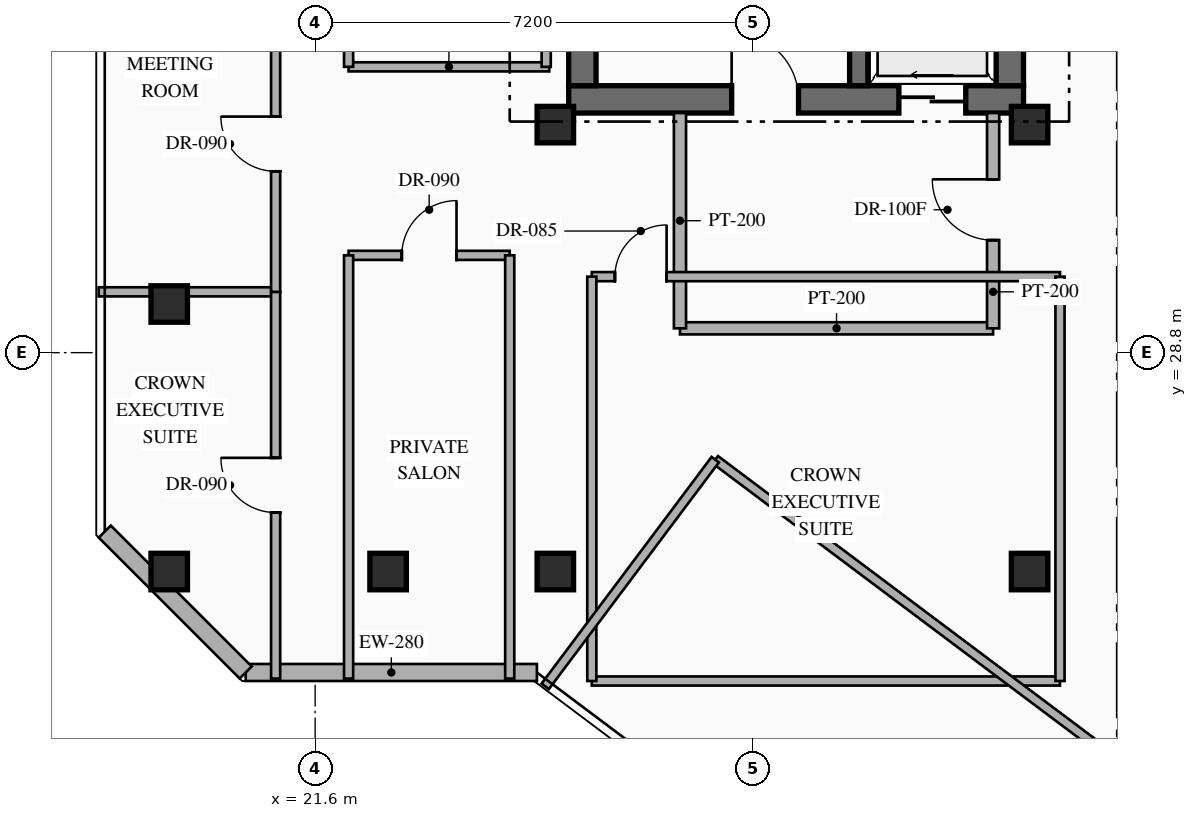
"""IFC4 building model, lengths in metres.
Left out: names, types, materials, properties, quantities, classifications, styles, units other than length and angle.
Written with IfcOpenShell. Run it as: python <this file> out.ifc"""

import sys

from ifc_helpers import new_model, si_unit, direction, frame, frame_2d, origin, origin_2d, place, context, subcontext, project, spatial, rectangle, hollow_rectangle, extrude, element, fill, save


model = new_model("IFC4")
c1 = context("Model", 3, precision=1e-05, world=origin(), true_north=direction((0.0, 1.0)))
c2 = subcontext(c1, "Body", "Model", "MODEL_VIEW")
j1 = project(units=[si_unit("LENGTHUNIT", "METRE"), si_unit("PLANEANGLEUNIT", "RADIAN")], contexts=[c1])
p1 = place(None, origin())
s1 = spatial("IfcSite", under=j1, at=p1, CompositionType="ELEMENT")
p2 = place(p1, origin())
s2 = spatial("IfcBuilding", under=s1, at=p2, CompositionType="ELEMENT")
p3 = place(p2, frame((0.0, 0.0, 269.95)))
s3 = spatial("IfcBuildingStorey", under=s2, at=p3, CompositionType="ELEMENT", Elevation=269.95)
p4 = place(p3, frame((25.77, 32.965, 0.0), z_axis=(0.0, 0.0, 1.0), x_axis=(1.0, 0.0, 0.0)))
e1 = element("IfcWall", 1, at=p4, inside=s3, PredefinedType="SHEAR", context=c2, shape_type="SweptSolid", body=[
    extrude(rectangle(XDim=7.48, YDim=0.45, at=frame_2d((3.74, 0.0))), origin(), (0.0, 0.0, 1.0), 4.0),
])
p5 = place(p4, frame((2.68, 0.0, 0.0)))
e2 = element("IfcOpeningElement", 2, at=p5, cuts=e1, PredefinedType="OPENING", context=c2, shape_type="SweptSolid", body=[
    extrude(rectangle(XDim=1.1, YDim=2.2, at=frame_2d((0.55, 1.1))), frame((0.0, 0.235, 0.0), z_axis=(0.0, -1.0, 0.0), x_axis=(1.0, 0.0, 0.0)), (0.0, 0.0, 1.0), 0.47),
])
p6 = place(p4, frame((5.43, 0.0, 0.0)))
e3 = element("IfcOpeningElement", 3, at=p6, cuts=e1, PredefinedType="OPENING", context=c2, shape_type="SweptSolid", body=[
    extrude(rectangle(XDim=1.1, YDim=2.15, at=frame_2d((0.55, 1.075))), frame((0.0, 0.235, 0.0), z_axis=(0.0, -1.0, 0.0), x_axis=(1.0, 0.0, 0.0)), (0.0, 0.0, 1.0), 0.47),
])
p7 = place(p3, frame((25.995, 33.19, 0.0), z_axis=(0.0, 0.0, 1.0), x_axis=(0.0, 1.0, 0.0)))
e4 = element("IfcWall", 4, at=p7, inside=s3, PredefinedType="SHEAR", context=c2, shape_type="SweptSolid", body=[
    extrude(rectangle(XDim=9.48, YDim=0.45, at=frame_2d((4.74, 0.0))), origin(), (0.0, 0.0, 1.0), 4.0),
])
p8 = place(p3, frame((33.025, 33.19, 0.0), z_axis=(0.0, 0.0, 1.0), x_axis=(0.0, 1.0, 0.0)))
e5 = element("IfcWall", 5, at=p8, inside=s3, PredefinedType="SHEAR", context=c2, shape_type="SweptSolid", body=[
    extrude(rectangle(XDim=9.48, YDim=0.45, at=frame_2d((4.74, 0.0))), origin(), (0.0, 0.0, 1.0), 4.0),
])
p9 = place(p8, frame((4.16, 0.0, 0.0)))
e6 = element("IfcOpeningElement", 6, at=p9, cuts=e5, PredefinedType="OPENING", context=c2, shape_type="SweptSolid", body=[
    extrude(rectangle(XDim=0.85, YDim=2.08, at=frame_2d((0.425, 1.04))), frame((0.0, 0.235, 0.0), z_axis=(0.0, -1.0, 0.0), x_axis=(1.0, 0.0, 0.0)), (0.0, 0.0, 1.0), 0.47),
])
p10 = place(p8, frame((7.36, 0.0, 0.0)))
e7 = element("IfcOpeningElement", 7, at=p10, cuts=e5, PredefinedType="OPENING", context=c2, shape_type="SweptSolid", body=[
    extrude(rectangle(XDim=0.85, YDim=2.08, at=frame_2d((0.425, 1.04))), frame((0.0, 0.235, 0.0), z_axis=(0.0, -1.0, 0.0), x_axis=(1.0, 0.0, 0.0)), (0.0, 0.0, 1.0), 0.47),
])
p11 = place(p3, frame((30.54, 33.19, 0.0), z_axis=(0.0, 0.0, 1.0), x_axis=(0.0, 1.0, 0.0)))
e8 = element("IfcWall", 8, at=p11, inside=s3, PredefinedType="SHEAR", context=c2, shape_type="SweptSolid", body=[
    extrude(rectangle(XDim=9.48, YDim=0.3, at=frame_2d((4.74, 0.0))), origin(), (0.0, 0.0, 1.0), 4.0),
])
for number, where, z_axis, x_axis in (
    (9, (25.55, 32.55, 0.0), (0.0, 0.0, 1.0), (1.0, 0.0, 0.0)),
    (10, (33.35, 32.55, 0.0), (0.0, 0.0, 1.0), (1.0, 0.0, 0.0)),
    (11, (25.55, 25.2, 0.0), (0.0, 0.0, 1.0), (1.0, 0.0, 0.0)),
    (12, (33.35, 25.2, 0.0), (0.0, 0.0, 1.0), (1.0, 0.0, 0.0)),
):
    element("IfcColumn", number, at=place(p3, frame(where, z_axis=z_axis, x_axis=x_axis)), inside=s3, PredefinedType="COLUMN", context=c2, shape_type="SweptSolid", body=[
        extrude(hollow_rectangle(XDim=0.6, YDim=0.6, WallThickness=0.025, at=origin_2d()), origin(), (0.0, 0.0, 1.0), 4.0),
    ])
for number, where, z_axis, x_axis in (
    (13, (19.2, 25.2, 0.0), (0.0, 0.0, 1.0), (1.0, 0.0, 0.0)),
    (14, (19.2, 29.6, 0.0), (0.0, 0.0, 1.0), (1.0, 0.0, 0.0)),
):
    element("IfcColumn", number, at=place(p3, frame(where, z_axis=z_axis, x_axis=x_axis)), inside=s3, PredefinedType="COLUMN", context=c2, shape_type="SweptSolid", body=[
        extrude(hollow_rectangle(XDim=0.6, YDim=0.6, WallThickness=0.025, at=origin_2d()), origin(), (0.0, 0.0, 1.0), 3.718),
    ])
p12 = place(p3, frame((22.8, 25.2, 0.0), z_axis=(0.0, 0.0, 1.0), x_axis=(1.0, 0.0, 0.0)))
e15 = element("IfcColumn", 15, at=p12, inside=s3, PredefinedType="COLUMN", context=c2, shape_type="SweptSolid", body=[
    extrude(hollow_rectangle(XDim=0.6, YDim=0.6, WallThickness=0.025, at=origin_2d()), origin(), (0.0, 0.0, 1.0), 4.0),
])
p13 = place(p3, frame((25.247, 23.54, 0.0), z_axis=(0.0, 0.0, 1.0), x_axis=(-1.0, 0.0, 0.0)))
e16 = element("IfcWall", 16, at=p13, inside=s3, PredefinedType="STANDARD", context=c2, shape_type="SweptSolid", body=[
    extrude(rectangle(XDim=4.789, YDim=0.28, at=frame_2d((2.395, 0.0))), origin(), (0.0, 0.0, 1.0), 3.74),
])
p14 = place(p3, frame((20.458, 23.54, 0.0), z_axis=(0.0, 0.0, 1.0), x_axis=(-0.707144017911, 0.707069542501, 0.0)))
e17 = element("IfcWall", 17, at=p14, inside=s3, PredefinedType="STANDARD", context=c2, shape_type="SweptSolid", body=[
    extrude(rectangle(XDim=3.278, YDim=0.28, at=frame_2d((1.639, 0.0))), origin(), (0.0, 0.0, 1.0), 3.74),
])
p15 = place(p3, frame((27.6, 29.2, 0.0), z_axis=(0.0, 0.0, 1.0), x_axis=(1.0, 0.0, 0.0)))
e18 = element("IfcWall", 18, at=p15, inside=s3, PredefinedType="STANDARD", context=c2, shape_type="SweptSolid", body=[
    extrude(rectangle(XDim=5.15, YDim=0.2, at=frame_2d((2.575, 0.0))), origin(), (0.0, 0.0, 1.0), 3.74),
])
p16 = place(p3, frame((27.6, 29.2, 0.0), z_axis=(0.0, 0.0, 1.0), x_axis=(0.0, 1.0, 0.0)))
e19 = element("IfcWall", 19, at=p16, inside=s3, PredefinedType="STANDARD", context=c2, shape_type="SweptSolid", body=[
    extrude(rectangle(XDim=3.54, YDim=0.2, at=frame_2d((1.77, 0.0))), origin(), (0.0, 0.0, 1.0), 3.74),
])
p17 = place(p3, frame((32.75, 29.2, 0.0), z_axis=(0.0, 0.0, 1.0), x_axis=(0.0, 1.0, 0.0)))
e20 = element("IfcWall", 20, at=p17, inside=s3, PredefinedType="STANDARD", context=c2, shape_type="SweptSolid", body=[
    extrude(rectangle(XDim=3.54, YDim=0.2, at=frame_2d((1.77, 0.0))), origin(), (0.0, 0.0, 1.0), 3.74),
])
p18 = place(p17, frame((1.45, 0.0, 0.0)))
e21 = element("IfcOpeningElement", 21, at=p18, cuts=e20, PredefinedType="OPENING", context=c2, shape_type="SweptSolid", body=[
    extrude(rectangle(XDim=1.0, YDim=2.2, at=frame_2d((0.5, 1.1))), frame((0.0, 0.11, 0.0), z_axis=(0.0, -1.0, 0.0), x_axis=(1.0, 0.0, 0.0)), (0.0, 0.0, 1.0), 0.22),
])
p19 = place(p3, frame((22.15, 33.5, 0.0), z_axis=(0.0, 0.0, 1.0), x_axis=(1.0, 0.0, 0.0)))
e22 = element("IfcWall", 22, at=p19, inside=s3, PredefinedType="PARTITIONING", context=c2, shape_type="SweptSolid", body=[
    extrude(rectangle(XDim=3.3, YDim=0.15, at=frame_2d((1.65, 0.0))), origin(), (0.0, 0.0, 1.0), 3.74),
])
p20 = place(p3, frame((25.4, 33.5, 0.0), z_axis=(0.0, 0.0, 1.0), x_axis=(0.0, 1.0, 0.0)))
e23 = element("IfcWall", 23, at=p20, inside=s3, PredefinedType="PARTITIONING", context=c2, shape_type="SweptSolid", body=[
    extrude(rectangle(XDim=6.6, YDim=0.15, at=frame_2d((3.3, 0.0))), origin(), (0.0, 0.0, 1.0), 3.74),
])
p21 = place(p3, frame((22.15, 33.5, 0.0), z_axis=(0.0, 0.0, 1.0), x_axis=(0.0, 1.0, 0.0)))
e24 = element("IfcWall", 24, at=p21, inside=s3, PredefinedType="PARTITIONING", context=c2, shape_type="SweptSolid", body=[
    extrude(rectangle(XDim=2.2, YDim=0.15, at=frame_2d((1.1, 0.0))), origin(), (0.0, 0.0, 1.0), 3.74),
])
p22 = place(p21, frame((0.7, 0.0, 0.0)))
e25 = element("IfcOpeningElement", 25, at=p22, cuts=e24, PredefinedType="OPENING", context=c2, shape_type="SweptSolid", body=[
    extrude(rectangle(XDim=0.8, YDim=2.06, at=frame_2d((0.4, 1.03))), frame((0.0, 0.085, 0.0), z_axis=(0.0, -1.0, 0.0), x_axis=(1.0, 0.0, 0.0)), (0.0, 0.0, 1.0), 0.17),
])
p23 = place(p3, frame((26.15, 23.4, 0.0), z_axis=(0.0, 0.0, 1.0), x_axis=(1.0, 0.0, 0.0)))
e26 = element("IfcWall", 26, at=p23, inside=s3, PredefinedType="PARTITIONING", context=c2, shape_type="SweptSolid", body=[
    extrude(rectangle(XDim=7.7, YDim=0.15, at=frame_2d((3.85, 0.0))), origin(), (0.0, 0.0, 1.0), 3.74),
])
p24 = place(p3, frame((26.15, 30.05, 0.0), z_axis=(0.0, 0.0, 1.0), x_axis=(1.0, 0.0, 0.0)))
e27 = element("IfcWall", 27, at=p24, inside=s3, PredefinedType="PARTITIONING", context=c2, shape_type="SweptSolid", body=[
    extrude(rectangle(XDim=7.7, YDim=0.15, at=frame_2d((3.85, 0.0))), origin(), (0.0, 0.0, 1.0), 3.74),
])
p25 = place(p24, frame((0.38, 0.0, 0.0)))
e28 = element("IfcOpeningElement", 28, at=p25, cuts=e27, PredefinedType="OPENING", context=c2, shape_type="SweptSolid", body=[
    extrude(rectangle(XDim=0.85, YDim=2.08, at=frame_2d((0.425, 1.04))), frame((0.0, 0.085, 0.0), z_axis=(0.0, -1.0, 0.0), x_axis=(1.0, 0.0, 0.0)), (0.0, 0.0, 1.0), 0.17),
])
for number, where, z_axis, x_axis in (
    (29, (26.15, 23.4, 0.0), (0.0, 0.0, 1.0), (0.0, 1.0, 0.0)),
    (30, (33.85, 23.4, 0.0), (0.0, 0.0, 1.0), (0.0, 1.0, 0.0)),
):
    element("IfcWall", number, at=place(p3, frame(where, z_axis=z_axis, x_axis=x_axis)), inside=s3, PredefinedType="PARTITIONING", context=c2, shape_type="SweptSolid", body=[
        extrude(rectangle(XDim=6.65, YDim=0.15, at=frame_2d((3.325, 0.0))), origin(), (0.0, 0.0, 1.0), 3.74),
    ])
p26 = place(p3, frame((28.18, 27.04, 0.0), z_axis=(0.0, 0.0, 1.0), x_axis=(0.8, -0.6, 0.0)))
e31 = element("IfcWall", 31, at=p26, inside=s3, PredefinedType="PARTITIONING", context=c2, shape_type="SweptSolid", body=[
    extrude(rectangle(XDim=17.76, YDim=0.15, at=frame_2d((8.88, 0.0))), origin(), (0.0, 0.0, 1.0), 3.74),
])
p27 = place(p26, frame((11.65, 0.0, 0.0)))
e32 = element("IfcOpeningElement", 32, at=p27, cuts=e31, PredefinedType="OPENING", context=c2, shape_type="SweptSolid", body=[
    extrude(rectangle(XDim=0.9, YDim=2.15, at=frame_2d((0.45, 1.075))), frame((0.0, 0.085, 0.0), z_axis=(0.0, -1.0, 0.0), x_axis=(1.0, 0.0, 0.0)), (0.0, 0.0, 1.0), 0.17),
])
p28 = place(p3, frame((25.384, 23.312, 0.0), z_axis=(0.0, 0.0, 1.0), x_axis=(0.599983234706, 0.800012573696, 0.0)))
e33 = element("IfcWall", 33, at=p28, inside=s3, PredefinedType="PARTITIONING", context=c2, shape_type="SweptSolid", body=[
    extrude(rectangle(XDim=4.66, YDim=0.15, at=frame_2d((2.33, 0.0))), origin(), (0.0, 0.0, 1.0), 3.74),
])
p29 = place(p3, frame((18.04, 29.8, 0.0), z_axis=(0.0, 0.0, 1.0), x_axis=(1.0, 0.0, 0.0)))
e34 = element("IfcWall", 34, at=p29, inside=s3, PredefinedType="PARTITIONING", context=c2, shape_type="SweptSolid", body=[
    extrude(rectangle(XDim=2.91, YDim=0.15, at=frame_2d((1.455, 0.0))), origin(), (0.0, 0.0, 1.0), 3.74),
])
p30 = place(p3, frame((20.95, 23.44, 0.0), z_axis=(0.0, 0.0, 1.0), x_axis=(0.0, 1.0, 0.0)))
e35 = element("IfcWall", 35, at=p30, inside=s3, PredefinedType="PARTITIONING", context=c2, shape_type="SweptSolid", body=[
    extrude(rectangle(XDim=6.36, YDim=0.15, at=frame_2d((3.18, 0.0))), origin(), (0.0, 0.0, 1.0), 3.74),
])
p31 = place(p30, frame((2.73, 0.0, 0.0)))
e36 = element("IfcOpeningElement", 36, at=p31, cuts=e35, PredefinedType="OPENING", context=c2, shape_type="SweptSolid", body=[
    extrude(rectangle(XDim=0.9, YDim=2.15, at=frame_2d((0.45, 1.075))), frame((0.0, 0.085, 0.0), z_axis=(0.0, -1.0, 0.0), x_axis=(1.0, 0.0, 0.0)), (0.0, 0.0, 1.0), 0.17),
])
p32 = place(p3, frame((20.95, 29.8, 0.0), z_axis=(0.0, 0.0, 1.0), x_axis=(0.0, 1.0, 0.0)))
e37 = element("IfcWall", 37, at=p32, inside=s3, PredefinedType="PARTITIONING", context=c2, shape_type="SweptSolid", body=[
    extrude(rectangle(XDim=7.0, YDim=0.15, at=frame_2d((3.5, 0.0))), origin(), (0.0, 0.0, 1.0), 3.74),
])
p33 = place(p32, frame((1.982, 0.0, 0.0)))
e38 = element("IfcOpeningElement", 38, at=p33, cuts=e37, PredefinedType="OPENING", context=c2, shape_type="SweptSolid", body=[
    extrude(rectangle(XDim=0.9, YDim=2.15, at=frame_2d((0.45, 1.075))), frame((0.0, 0.085, 0.0), z_axis=(0.0, -1.0, 0.0), x_axis=(1.0, 0.0, 0.0)), (0.0, 0.0, 1.0), 0.17),
])
p34 = place(p3, frame((22.15, 30.4, 0.0), z_axis=(0.0, 0.0, 1.0), x_axis=(1.0, 0.0, 0.0)))
e39 = element("IfcWall", 39, at=p34, inside=s3, PredefinedType="PARTITIONING", context=c2, shape_type="SweptSolid", body=[
    extrude(rectangle(XDim=2.65, YDim=0.15, at=frame_2d((1.325, 0.0))), origin(), (0.0, 0.0, 1.0), 3.74),
])
p35 = place(p34, frame((0.875, 0.0, 0.0)))
e40 = element("IfcOpeningElement", 40, at=p35, cuts=e39, PredefinedType="OPENING", context=c2, shape_type="SweptSolid", body=[
    extrude(rectangle(XDim=0.9, YDim=2.15, at=frame_2d((0.45, 1.075))), frame((0.0, 0.085, 0.0), z_axis=(0.0, -1.0, 0.0), x_axis=(1.0, 0.0, 0.0)), (0.0, 0.0, 1.0), 0.17),
])
for number, where, z_axis, x_axis in (
    (41, (22.15, 23.44, 0.0), (0.0, 0.0, 1.0), (0.0, 1.0, 0.0)),
    (42, (24.8, 23.44, 0.0), (0.0, 0.0, 1.0), (0.0, 1.0, 0.0)),
):
    element("IfcWall", number, at=place(p3, frame(where, z_axis=z_axis, x_axis=x_axis)), inside=s3, PredefinedType="PARTITIONING", context=c2, shape_type="SweptSolid", body=[
        extrude(rectangle(XDim=6.96, YDim=0.15, at=frame_2d((3.48, 0.0))), origin(), (0.0, 0.0, 1.0), 3.74),
    ])
p36 = place(p5, origin())
e43 = element("IfcDoor", 43, at=p36, inside=s3, OperationType="SINGLE_SWING_LEFT", PredefinedType="DOOR", context=c2, shape_type="SweptSolid", body=[
    extrude(rectangle(XDim=1.1, YDim=2.2, at=frame_2d((0.55, 1.1))), frame((0.0, 0.025, 0.0), z_axis=(0.0, -1.0, 0.0), x_axis=(1.0, 0.0, 0.0)), (0.0, 0.0, 1.0), 0.05),
])
fill(e2, e43)
p37 = place(p6, origin())
e44 = element("IfcDoor", 44, at=p37, inside=s3, OperationType="SLIDING_TO_LEFT", PredefinedType="USERDEFINED", context=c2, shape_type="SweptSolid", body=[
    extrude(rectangle(XDim=1.1, YDim=2.15, at=frame_2d((0.55, 1.075))), frame((0.0, 0.025, 0.0), z_axis=(0.0, -1.0, 0.0), x_axis=(1.0, 0.0, 0.0)), (0.0, 0.0, 1.0), 0.05),
])
fill(e3, e44)
p38 = place(p18, origin())
e45 = element("IfcDoor", 45, at=p38, inside=s3, OperationType="SINGLE_SWING_RIGHT", PredefinedType="DOOR", context=c2, shape_type="SweptSolid", body=[
    extrude(rectangle(XDim=1.0, YDim=2.2, at=frame_2d((0.5, 1.1))), frame((0.0, 0.025, 0.0), z_axis=(0.0, -1.0, 0.0), x_axis=(1.0, 0.0, 0.0)), (0.0, 0.0, 1.0), 0.05),
])
fill(e21, e45)
p39 = place(p25, origin())
e46 = element("IfcDoor", 46, at=p39, inside=s3, OperationType="SINGLE_SWING_RIGHT", PredefinedType="DOOR", context=c2, shape_type="SweptSolid", body=[
    extrude(rectangle(XDim=0.85, YDim=2.08, at=frame_2d((0.425, 1.04))), frame((0.0, 0.025, 0.0), z_axis=(0.0, -1.0, 0.0), x_axis=(1.0, 0.0, 0.0)), (0.0, 0.0, 1.0), 0.05),
])
fill(e28, e46)
p40 = place(p31, origin())
e47 = element("IfcDoor", 47, at=p40, inside=s3, OperationType="SINGLE_SWING_RIGHT", PredefinedType="DOOR", context=c2, shape_type="SweptSolid", body=[
    extrude(rectangle(XDim=0.9, YDim=2.15, at=frame_2d((0.45, 1.075))), frame((0.0, 0.025, 0.0), z_axis=(0.0, -1.0, 0.0), x_axis=(1.0, 0.0, 0.0)), (0.0, 0.0, 1.0), 0.05),
])
fill(e36, e47)
p41 = place(p33, origin())
e48 = element("IfcDoor", 48, at=p41, inside=s3, OperationType="SINGLE_SWING_RIGHT", PredefinedType="DOOR", context=c2, shape_type="SweptSolid", body=[
    extrude(rectangle(XDim=0.9, YDim=2.15, at=frame_2d((0.45, 1.075))), frame((0.0, 0.025, 0.0), z_axis=(0.0, -1.0, 0.0), x_axis=(1.0, 0.0, 0.0)), (0.0, 0.0, 1.0), 0.05),
])
fill(e38, e48)
p42 = place(p35, origin())
e49 = element("IfcDoor", 49, at=p42, inside=s3, OperationType="SINGLE_SWING_RIGHT", PredefinedType="DOOR", context=c2, shape_type="SweptSolid", body=[
    extrude(rectangle(XDim=0.9, YDim=2.15, at=frame_2d((0.45, 1.075))), frame((0.0, 0.025, 0.0), z_axis=(0.0, -1.0, 0.0), x_axis=(1.0, 0.0, 0.0)), (0.0, 0.0, 1.0), 0.05),
])
fill(e40, e49)
save(model, sys.argv[1])
